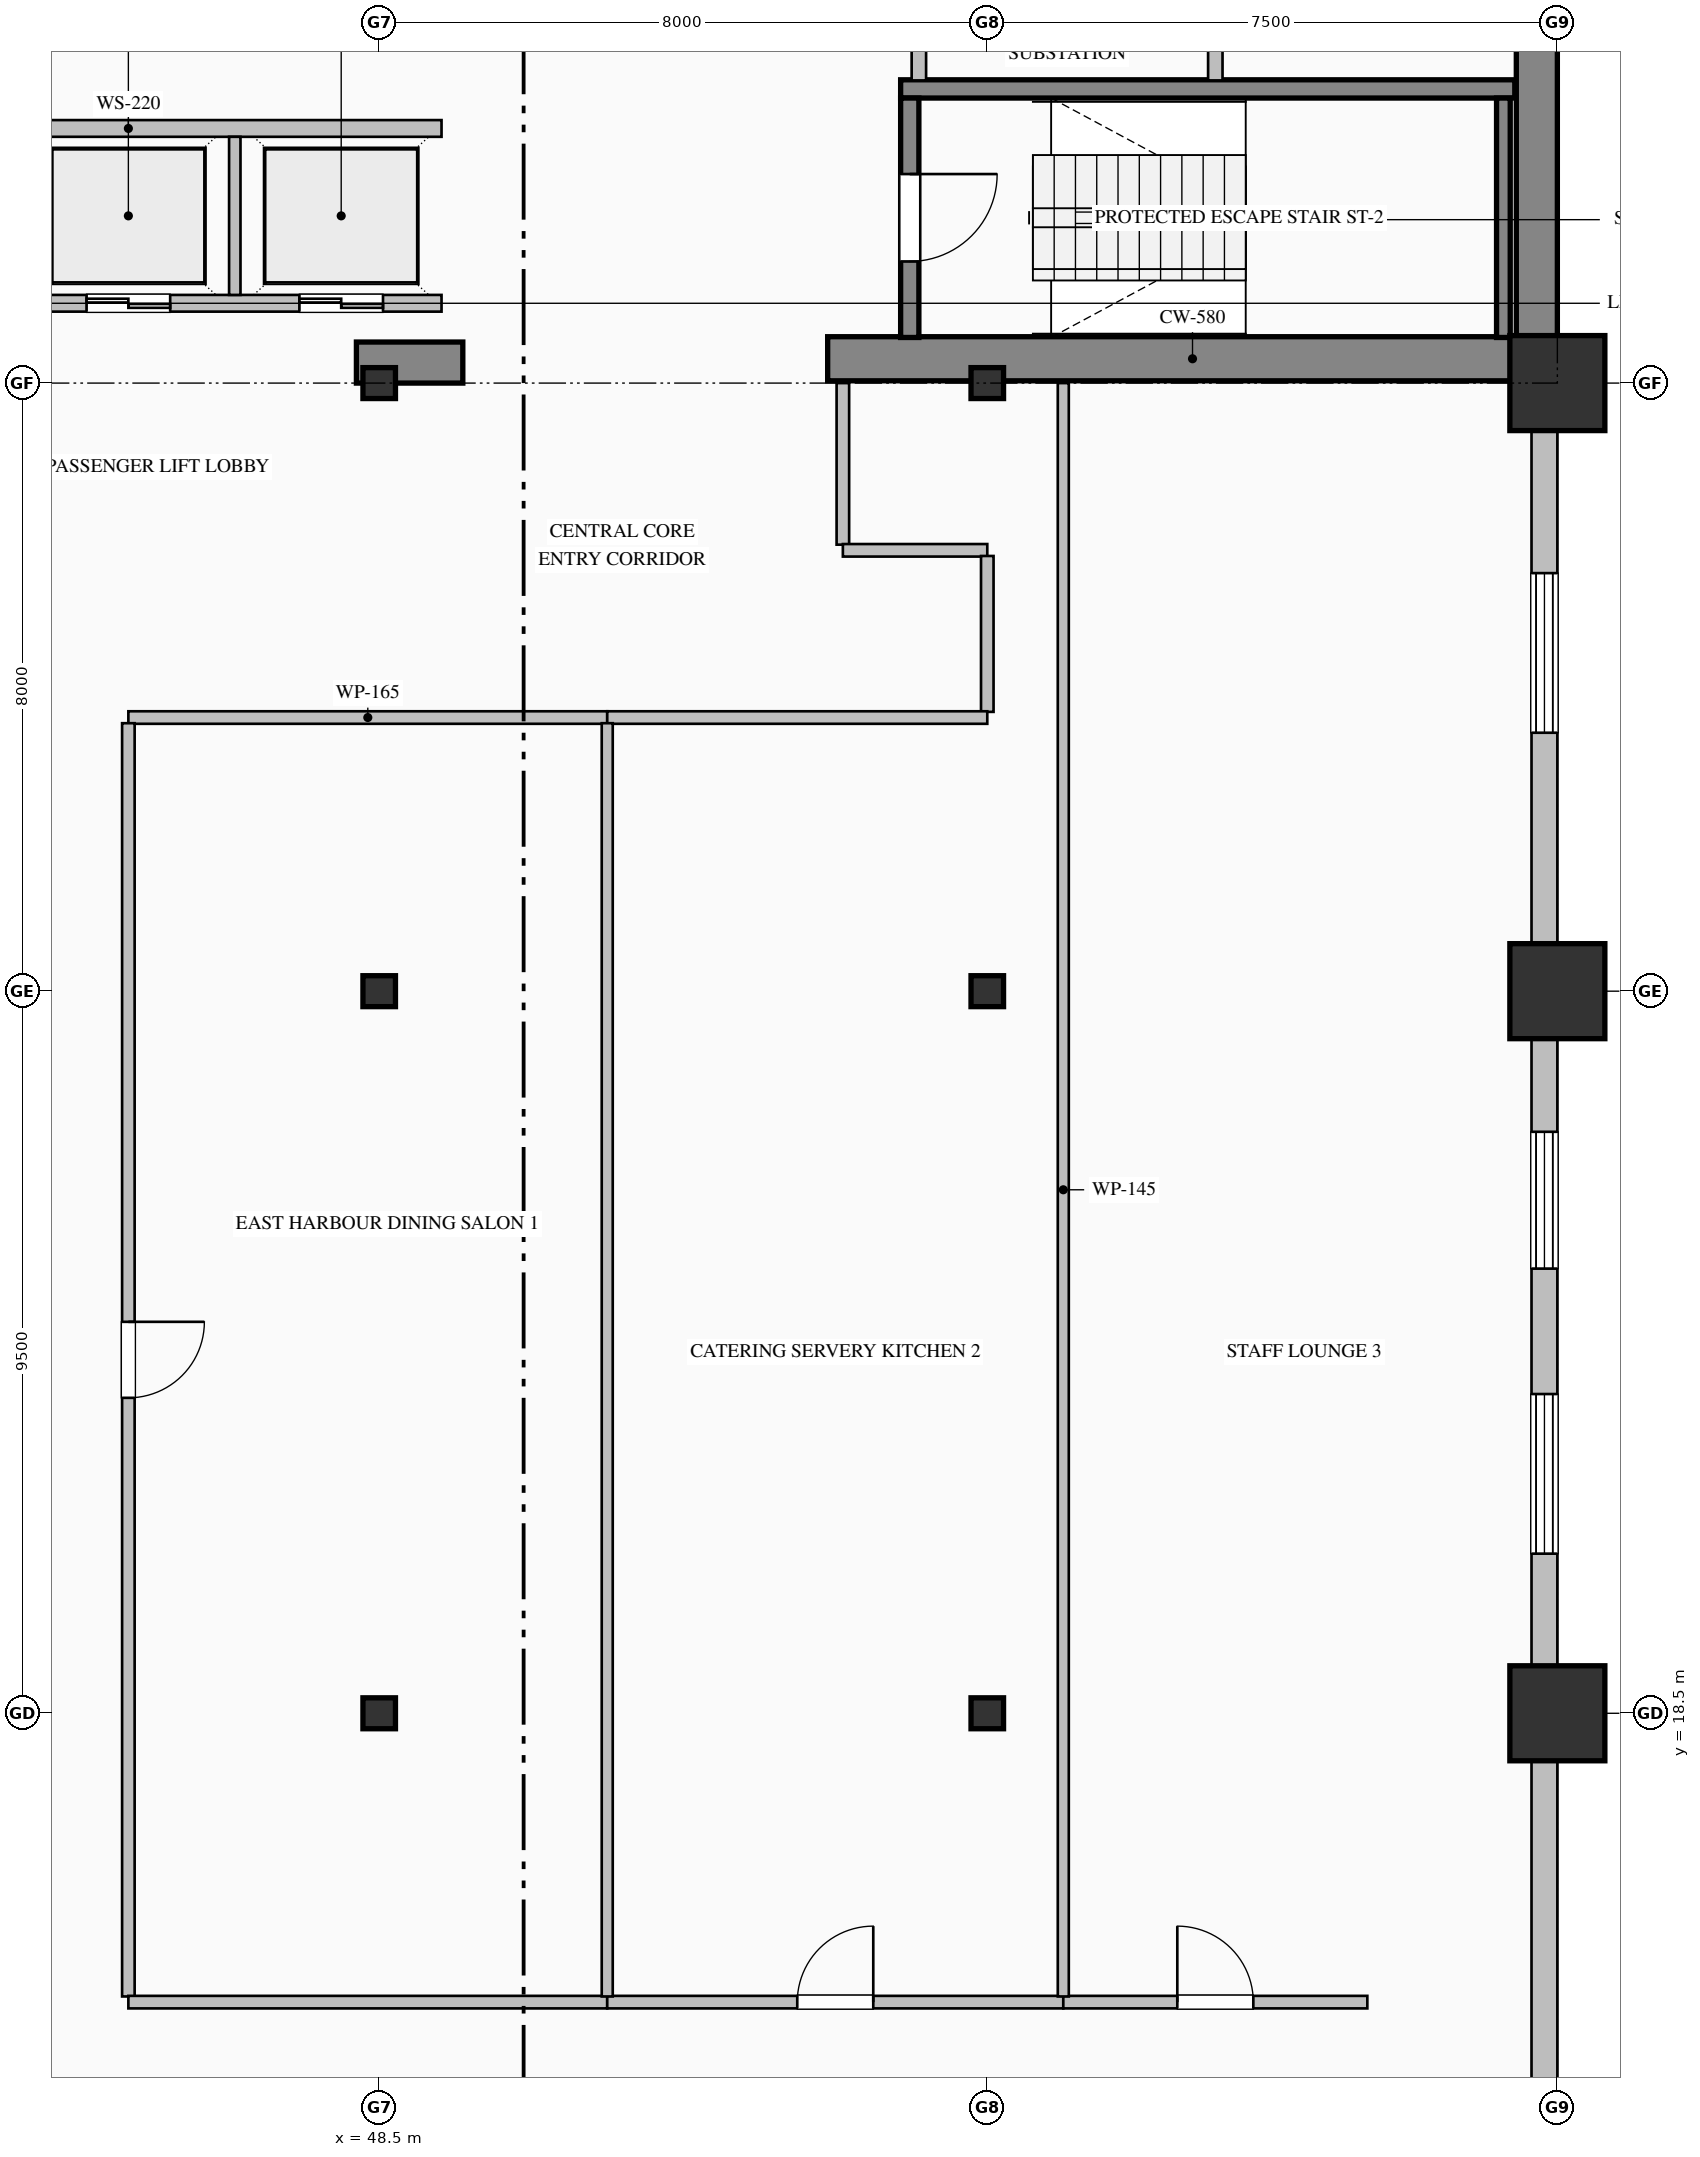
"""IFC4 building model, lengths in metres.
Left out: names, types, materials, properties, quantities, classifications, styles, units other than length and angle.
Written with IfcOpenShell. Run it as: python <this file> out.ifc"""

import sys

from ifc_helpers import new_model, si_unit, direction, frame, frame_2d, origin, origin_2d, place, context, subcontext, project, spatial, rectangle, hollow_rectangle, i_section, extrude, element, fill, save


model = new_model("IFC4")
c1 = context("Model", 3, precision=1e-05, world=origin(), true_north=direction((0.0, 1.0)))
c2 = subcontext(c1, "Body", "Model", "MODEL_VIEW")
j1 = project(units=[si_unit("LENGTHUNIT", "METRE"), si_unit("PLANEANGLEUNIT", "RADIAN")], contexts=[c1])
p1 = place(None, origin())
s1 = spatial("IfcSite", under=j1, at=p1, CompositionType="ELEMENT")
p2 = place(p1, origin())
s2 = spatial("IfcBuilding", under=s1, at=p2, CompositionType="ELEMENT")
p3 = place(p2, frame((0.0, 0.0, 68.2)))
s3 = spatial("IfcBuildingStorey", under=s2, at=p3, CompositionType="ELEMENT", Elevation=68.2)
p4 = place(p3, frame((63.73, 36.32, 0.0), z_axis=(0.0, 0.0, 1.0), x_axis=(0.0, 1.0, 0.0)))
e1 = element("IfcWall", 1, at=p4, inside=s3, PredefinedType="SHEAR", context=c2, shape_type="SweptSolid", body=[
    extrude(rectangle(XDim=15.14, YDim=0.54, at=frame_2d((7.57, 0.0))), origin(), (0.0, 0.0, 1.0), 3.75),
])
p5 = place(p3, frame((48.2, 36.27, 0.0), z_axis=(0.0, 0.0, 1.0), x_axis=(1.0, 0.0, 0.0)))
e2 = element("IfcWall", 2, at=p5, inside=s3, PredefinedType="SHEAR", context=c2, shape_type="SweptSolid", body=[
    extrude(rectangle(XDim=1.4, YDim=0.54, at=frame_2d((0.7, 0.0))), origin(), (0.0, 0.0, 1.0), 3.75),
])
p6 = place(p3, frame((54.4, 36.32, 0.0), z_axis=(0.0, 0.0, 1.0), x_axis=(1.0, 0.0, 0.0)))
e3 = element("IfcWall", 3, at=p6, inside=s3, PredefinedType="SHEAR", context=c2, shape_type="SweptSolid", body=[
    extrude(rectangle(XDim=9.6, YDim=0.58, at=frame_2d((4.8, 0.0))), origin(), (0.0, 0.0, 1.0), 4.0),
])
for number, where, z_axis, x_axis in (
    (4, (48.5, 18.5, 0.0), (0.0, 0.0, 1.0), (1.0, 0.0, 0.0)),
    (5, (48.5, 28.0, 0.0), (0.0, 0.0, 1.0), (1.0, 0.0, 0.0)),
    (6, (48.5, 36.0, 0.0), (0.0, 0.0, 1.0), (1.0, 0.0, 0.0)),
    (7, (56.5, 18.5, 0.0), (0.0, 0.0, 1.0), (1.0, 0.0, 0.0)),
    (8, (56.5, 28.0, 0.0), (0.0, 0.0, 1.0), (1.0, 0.0, 0.0)),
    (9, (56.5, 36.0, 0.0), (0.0, 0.0, 1.0), (1.0, 0.0, 0.0)),
):
    element("IfcColumn", number, at=place(p3, frame(where, z_axis=z_axis, x_axis=x_axis)), inside=s3, PredefinedType="COLUMN", context=c2, shape_type="SweptSolid", body=[
        extrude(i_section(OverallWidth=0.407, OverallDepth=0.428, WebThickness=0.02, FlangeThickness=0.035, FilletRadius=0.022, at=origin_2d()), origin(), (0.0, 0.0, 1.0), 4.0),
    ])
for number, where, z_axis, x_axis in (
    (10, (64.0, 18.5, 0.0), (0.0, 0.0, 1.0), (1.0, 0.0, 0.0)),
    (11, (64.0, 28.0, 0.0), (0.0, 0.0, 1.0), (1.0, 0.0, 0.0)),
    (12, (64.0, 36.0, 0.0), (0.0, 0.0, 1.0), (1.0, 0.0, 0.0)),
):
    element("IfcColumn", number, at=place(p3, frame(where, z_axis=z_axis, x_axis=x_axis)), inside=s3, PredefinedType="COLUMN", context=c2, shape_type="SweptSolid", body=[
        extrude(hollow_rectangle(XDim=1.25, YDim=1.25, WallThickness=0.045, at=origin_2d()), origin(), (0.0, 0.0, 1.0), 4.0),
    ])
p7 = place(p3, frame((63.83, 36.05, 0.0), z_axis=(0.0, 0.0, 1.0), x_axis=(0.0, -1.0, 0.0)))
e13 = element("IfcWall", 13, at=p7, inside=s3, PredefinedType="SOLIDWALL", context=c2, shape_type="SweptSolid", body=[
    extrude(rectangle(XDim=28.05, YDim=0.34, at=frame_2d((14.025, 0.0))), origin(), (0.0, 0.0, 1.0), 3.25),
])
p8 = place(p7, frame((2.55, 0.0, 0.85)))
e14 = element("IfcOpeningElement", 14, at=p8, cuts=e13, PredefinedType="OPENING", context=c2, shape_type="SweptSolid", body=[
    extrude(rectangle(XDim=2.1, YDim=2.05, at=frame_2d((1.05, 1.025))), frame((0.0, 0.18, 0.0), z_axis=(0.0, -1.0, 0.0), x_axis=(1.0, 0.0, 0.0)), (0.0, 0.0, 1.0), 0.36),
])
p9 = place(p7, frame((9.9, 0.0, 0.85)))
e15 = element("IfcOpeningElement", 15, at=p9, cuts=e13, PredefinedType="OPENING", context=c2, shape_type="SweptSolid", body=[
    extrude(rectangle(XDim=1.8, YDim=2.05, at=frame_2d((0.9, 1.025))), frame((0.0, 0.18, 0.0), z_axis=(0.0, -1.0, 0.0), x_axis=(1.0, 0.0, 0.0)), (0.0, 0.0, 1.0), 0.36),
])
p10 = place(p7, frame((13.35, 0.0, 0.85)))
e16 = element("IfcOpeningElement", 16, at=p10, cuts=e13, PredefinedType="OPENING", context=c2, shape_type="SweptSolid", body=[
    extrude(rectangle(XDim=2.1, YDim=2.05, at=frame_2d((1.05, 1.025))), frame((0.0, 0.18, 0.0), z_axis=(0.0, -1.0, 0.0), x_axis=(1.0, 0.0, 0.0)), (0.0, 0.0, 1.0), 0.36),
])
p11 = place(p3, frame((55.36, 39.87, 0.0), z_axis=(0.0, 0.0, 1.0), x_axis=(1.0, 0.0, 0.0)))
e17 = element("IfcWall", 17, at=p11, inside=s3, PredefinedType="SOLIDWALL", context=c2, shape_type="SweptSolid", body=[
    extrude(rectangle(XDim=8.08, YDim=0.24, at=frame_2d((4.04, 0.0))), origin(), (0.0, 0.0, 1.0), 4.0),
])
p12 = place(p3, frame((55.48, 39.75, 0.0), z_axis=(0.0, 0.0, 1.0), x_axis=(0.0, -1.0, 0.0)))
e18 = element("IfcWall", 18, at=p12, inside=s3, PredefinedType="SOLIDWALL", context=c2, shape_type="SweptSolid", body=[
    extrude(rectangle(XDim=3.15, YDim=0.24, at=frame_2d((1.575, 0.0))), origin(), (0.0, 0.0, 1.0), 4.0),
])
p13 = place(p12, frame((1.0, 0.0, 0.0)))
e19 = element("IfcOpeningElement", 19, at=p13, cuts=e18, PredefinedType="OPENING", context=c2, shape_type="SweptSolid", body=[
    extrude(rectangle(XDim=1.15, YDim=2.2, at=frame_2d((0.575, 1.1))), frame((0.0, 0.13, 0.0), z_axis=(0.0, -1.0, 0.0), x_axis=(1.0, 0.0, 0.0)), (0.0, 0.0, 1.0), 0.26),
])
p14 = place(p3, frame((63.29, 36.6, 0.0), z_axis=(0.0, 0.0, 1.0), x_axis=(0.0, 1.0, 0.0)))
e20 = element("IfcWall", 20, at=p14, inside=s3, PredefinedType="SOLIDWALL", context=c2, shape_type="SweptSolid", body=[
    extrude(rectangle(XDim=3.15, YDim=0.18, at=frame_2d((1.575, 0.0))), origin(), (0.0, 0.0, 1.0), 4.0),
])
p15 = place(p3, frame((49.32, 37.05, 0.0), z_axis=(0.0, 0.0, 1.0), x_axis=(-1.0, 0.0, 0.0)))
e21 = element("IfcWall", 21, at=p15, inside=s3, PredefinedType="PARTITIONING", context=c2, shape_type="SweptSolid", body=[
    extrude(rectangle(XDim=8.24, YDim=0.22, at=frame_2d((4.12, 0.0))), origin(), (0.0, 0.0, 1.0), 3.75),
])
p16 = place(p15, frame((6.37, 0.0, 0.0)))
e22 = element("IfcOpeningElement", 22, at=p16, cuts=e21, PredefinedType="OPENING", context=c2, shape_type="SweptSolid", body=[
    extrude(rectangle(XDim=1.1, YDim=2.2, at=frame_2d((0.55, 1.1))), frame((0.0, 0.12, 0.0), z_axis=(0.0, -1.0, 0.0), x_axis=(1.0, 0.0, 0.0)), (0.0, 0.0, 1.0), 0.24),
])
p17 = place(p15, frame((3.57, 0.0, 0.0)))
e23 = element("IfcOpeningElement", 23, at=p17, cuts=e21, PredefinedType="OPENING", context=c2, shape_type="SweptSolid", body=[
    extrude(rectangle(XDim=1.1, YDim=2.2, at=frame_2d((0.55, 1.1))), frame((0.0, 0.12, 0.0), z_axis=(0.0, -1.0, 0.0), x_axis=(1.0, 0.0, 0.0)), (0.0, 0.0, 1.0), 0.24),
])
p18 = place(p15, frame((0.77, 0.0, 0.0)))
e24 = element("IfcOpeningElement", 24, at=p18, cuts=e21, PredefinedType="OPENING", context=c2, shape_type="SweptSolid", body=[
    extrude(rectangle(XDim=1.1, YDim=2.2, at=frame_2d((0.55, 1.1))), frame((0.0, 0.12, 0.0), z_axis=(0.0, -1.0, 0.0), x_axis=(1.0, 0.0, 0.0)), (0.0, 0.0, 1.0), 0.24),
])
p19 = place(p3, frame((41.08, 39.35, 0.0), z_axis=(0.0, 0.0, 1.0), x_axis=(1.0, 0.0, 0.0)))
e25 = element("IfcWall", 25, at=p19, inside=s3, PredefinedType="PARTITIONING", context=c2, shape_type="SweptSolid", body=[
    extrude(rectangle(XDim=8.24, YDim=0.22, at=frame_2d((4.12, 0.0))), origin(), (0.0, 0.0, 1.0), 3.75),
])
p20 = place(p3, frame((46.6, 37.16, 0.0), z_axis=(0.0, 0.0, 1.0), x_axis=(0.0, 1.0, 0.0)))
e26 = element("IfcWall", 26, at=p20, inside=s3, PredefinedType="PARTITIONING", context=c2, shape_type="SweptSolid", body=[
    extrude(rectangle(XDim=2.08, YDim=0.15, at=frame_2d((1.04, 0.0))), origin(), (0.0, 0.0, 1.0), 3.75),
])
for number, where, z_axis, x_axis in (
    (27, (55.6, 42.713, 0.0), (0.0, 0.0, 1.0), (0.0, -1.0, 0.0)),
    (28, (59.5, 42.713, 0.0), (0.0, 0.0, 1.0), (0.0, -1.0, 0.0)),
):
    element("IfcWall", number, at=place(p3, frame(where, z_axis=z_axis, x_axis=x_axis)), inside=s3, PredefinedType="PARTITIONING", context=c2, shape_type="SweptSolid", body=[
        extrude(rectangle(XDim=2.731, YDim=0.19, at=frame_2d((1.365, 0.0))), origin(), (0.0, 0.0, 1.0), 3.75),
    ])
p21 = place(p3, frame((51.5, 31.6, 0.0), z_axis=(0.0, 0.0, 1.0), x_axis=(-1.0, 0.0, 0.0)))
e29 = element("IfcWall", 29, at=p21, inside=s3, PredefinedType="PARTITIONING", context=c2, shape_type="SweptSolid", body=[
    extrude(rectangle(XDim=6.3, YDim=0.165, at=frame_2d((3.15, 0.0))), origin(), (0.0, 0.0, 1.0), 3.75),
])
p22 = place(p3, frame((54.6, 36.0, 0.0), z_axis=(0.0, 0.0, 1.0), x_axis=(0.0, -1.0, 0.0)))
e30 = element("IfcWall", 30, at=p22, inside=s3, PredefinedType="PARTITIONING", context=c2, shape_type="SweptSolid", body=[
    extrude(rectangle(XDim=2.125, YDim=0.165, at=frame_2d((1.063, 0.0))), origin(), (0.0, 0.0, 1.0), 3.75),
])
p23 = place(p3, frame((54.6, 33.8, 0.0), z_axis=(0.0, 0.0, 1.0), x_axis=(1.0, 0.0, 0.0)))
e31 = element("IfcWall", 31, at=p23, inside=s3, PredefinedType="PARTITIONING", context=c2, shape_type="SweptSolid", body=[
    extrude(rectangle(XDim=1.9, YDim=0.165, at=frame_2d((0.95, 0.0))), origin(), (0.0, 0.0, 1.0), 3.75),
])
p24 = place(p3, frame((56.5, 33.726, 0.0), z_axis=(0.0, 0.0, 1.0), x_axis=(0.0, -1.0, 0.0)))
e32 = element("IfcWall", 32, at=p24, inside=s3, PredefinedType="PARTITIONING", context=c2, shape_type="SweptSolid", body=[
    extrude(rectangle(XDim=2.051, YDim=0.165, at=frame_2d((1.025, 0.0))), origin(), (0.0, 0.0, 1.0), 3.042),
])
p25 = place(p3, frame((56.5, 31.6, 0.0), z_axis=(0.0, 0.0, 1.0), x_axis=(-1.0, 0.0, 0.0)))
e33 = element("IfcWall", 33, at=p25, inside=s3, PredefinedType="PARTITIONING", context=c2, shape_type="SweptSolid", body=[
    extrude(rectangle(XDim=5.0, YDim=0.165, at=frame_2d((2.5, 0.0))), origin(), (0.0, 0.0, 1.0), 3.75),
])
p26 = place(p3, frame((45.2, 31.525, 0.0), z_axis=(0.0, 0.0, 1.0), x_axis=(0.0, -1.0, 0.0)))
e34 = element("IfcWall", 34, at=p26, inside=s3, PredefinedType="PARTITIONING", context=c2, shape_type="SweptSolid", body=[
    extrude(rectangle(XDim=16.751, YDim=0.165, at=frame_2d((8.375, 0.0))), origin(), (0.0, 0.0, 1.0), 3.75),
])
p27 = place(p26, frame((7.875, 0.0, 0.0)))
e35 = element("IfcOpeningElement", 35, at=p27, cuts=e34, PredefinedType="OPENING", context=c2, shape_type="SweptSolid", body=[
    extrude(rectangle(XDim=1.0, YDim=2.15, at=frame_2d((0.5, 1.075))), frame((0.0, 0.093, 0.0), z_axis=(0.0, -1.0, 0.0), x_axis=(1.0, 0.0, 0.0)), (0.0, 0.0, 1.0), 0.185),
])
p28 = place(p3, frame((45.2, 14.7, 0.0), z_axis=(0.0, 0.0, 1.0), x_axis=(1.0, 0.0, 0.0)))
e36 = element("IfcWall", 36, at=p28, inside=s3, PredefinedType="PARTITIONING", context=c2, shape_type="SweptSolid", body=[
    extrude(rectangle(XDim=6.3, YDim=0.165, at=frame_2d((3.15, 0.0))), origin(), (0.0, 0.0, 1.0), 3.75),
])
p29 = place(p3, frame((51.5, 14.7, 0.0), z_axis=(0.0, 0.0, 1.0), x_axis=(1.0, 0.0, 0.0)))
e37 = element("IfcWall", 37, at=p29, inside=s3, PredefinedType="PARTITIONING", context=c2, shape_type="SweptSolid", body=[
    extrude(rectangle(XDim=6.0, YDim=0.165, at=frame_2d((3.0, 0.0))), origin(), (0.0, 0.0, 1.0), 3.75),
])
p30 = place(p29, frame((2.5, 0.0, 0.0)))
e38 = element("IfcOpeningElement", 38, at=p30, cuts=e37, PredefinedType="OPENING", context=c2, shape_type="SweptSolid", body=[
    extrude(rectangle(XDim=1.0, YDim=2.15, at=frame_2d((0.5, 1.075))), frame((0.0, 0.093, 0.0), z_axis=(0.0, -1.0, 0.0), x_axis=(1.0, 0.0, 0.0)), (0.0, 0.0, 1.0), 0.185),
])
p31 = place(p3, frame((57.5, 14.7, 0.0), z_axis=(0.0, 0.0, 1.0), x_axis=(1.0, 0.0, 0.0)))
e39 = element("IfcWall", 39, at=p31, inside=s3, PredefinedType="PARTITIONING", context=c2, shape_type="SweptSolid", body=[
    extrude(rectangle(XDim=4.0, YDim=0.165, at=frame_2d((2.0, 0.0))), origin(), (0.0, 0.0, 1.0), 3.75),
])
p32 = place(p31, frame((1.5, 0.0, 0.0)))
e40 = element("IfcOpeningElement", 40, at=p32, cuts=e39, PredefinedType="OPENING", context=c2, shape_type="SweptSolid", body=[
    extrude(rectangle(XDim=1.0, YDim=2.15, at=frame_2d((0.5, 1.075))), frame((0.0, 0.093, 0.0), z_axis=(0.0, -1.0, 0.0), x_axis=(1.0, 0.0, 0.0)), (0.0, 0.0, 1.0), 0.185),
])
p33 = place(p3, frame((51.5, 31.525, 0.0), z_axis=(0.0, 0.0, 1.0), x_axis=(0.0, -1.0, 0.0)))
e41 = element("IfcWall", 41, at=p33, inside=s3, PredefinedType="PARTITIONING", context=c2, shape_type="SweptSolid", body=[
    extrude(rectangle(XDim=16.751, YDim=0.145, at=frame_2d((8.375, 0.0))), origin(), (0.0, 0.0, 1.0), 3.75),
])
p34 = place(p3, frame((57.5, 36.0, 0.0), z_axis=(0.0, 0.0, 1.0), x_axis=(0.0, -1.0, 0.0)))
e42 = element("IfcWall", 42, at=p34, inside=s3, PredefinedType="PARTITIONING", context=c2, shape_type="SweptSolid", body=[
    extrude(rectangle(XDim=21.226, YDim=0.145, at=frame_2d((10.613, 0.0))), origin(), (0.0, 0.0, 1.0), 3.75),
])
p35 = place(p8, origin())
e43 = element("IfcWindow", 43, at=p35, inside=s3, PartitioningType="TRIPLE_PANEL_VERTICAL", PredefinedType="WINDOW", context=c2, shape_type="SweptSolid", body=[
    extrude(rectangle(XDim=2.1, YDim=2.05, at=frame_2d((1.05, 1.025))), frame((0.0, 0.15, 0.0), z_axis=(0.0, -1.0, 0.0), x_axis=(1.0, 0.0, 0.0)), (0.0, 0.0, 1.0), 0.06),
])
fill(e14, e43)
p36 = place(p9, origin())
e44 = element("IfcWindow", 44, at=p36, inside=s3, PartitioningType="TRIPLE_PANEL_VERTICAL", PredefinedType="WINDOW", context=c2, shape_type="SweptSolid", body=[
    extrude(rectangle(XDim=1.8, YDim=2.05, at=frame_2d((0.9, 1.025))), frame((0.0, 0.15, 0.0), z_axis=(0.0, -1.0, 0.0), x_axis=(1.0, 0.0, 0.0)), (0.0, 0.0, 1.0), 0.06),
])
fill(e15, e44)
p37 = place(p10, origin())
e45 = element("IfcWindow", 45, at=p37, inside=s3, PartitioningType="TRIPLE_PANEL_VERTICAL", PredefinedType="WINDOW", context=c2, shape_type="SweptSolid", body=[
    extrude(rectangle(XDim=2.1, YDim=2.05, at=frame_2d((1.05, 1.025))), frame((0.0, 0.15, 0.0), z_axis=(0.0, -1.0, 0.0), x_axis=(1.0, 0.0, 0.0)), (0.0, 0.0, 1.0), 0.06),
])
fill(e16, e45)
p38 = place(p13, origin())
e46 = element("IfcDoor", 46, at=p38, inside=s3, OperationType="SINGLE_SWING_LEFT", PredefinedType="DOOR", context=c2, shape_type="SweptSolid", body=[
    extrude(rectangle(XDim=1.15, YDim=2.2, at=frame_2d((0.575, 1.1))), frame((0.0, 0.025, 0.0), z_axis=(0.0, -1.0, 0.0), x_axis=(1.0, 0.0, 0.0)), (0.0, 0.0, 1.0), 0.05),
])
fill(e19, e46)
p39 = place(p17, origin())
e47 = element("IfcDoor", 47, at=p39, inside=s3, OperationType="DOUBLE_DOOR_SLIDING", PredefinedType="DOOR", context=c2, shape_type="SweptSolid", body=[
    extrude(rectangle(XDim=1.1, YDim=2.2, at=frame_2d((0.55, 1.1))), frame((0.0, 0.025, 0.0), z_axis=(0.0, -1.0, 0.0), x_axis=(1.0, 0.0, 0.0)), (0.0, 0.0, 1.0), 0.05),
])
fill(e23, e47)
p40 = place(p18, origin())
e48 = element("IfcDoor", 48, at=p40, inside=s3, OperationType="DOUBLE_DOOR_SLIDING", PredefinedType="DOOR", context=c2, shape_type="SweptSolid", body=[
    extrude(rectangle(XDim=1.1, YDim=2.2, at=frame_2d((0.55, 1.1))), frame((0.0, 0.025, 0.0), z_axis=(0.0, -1.0, 0.0), x_axis=(1.0, 0.0, 0.0)), (0.0, 0.0, 1.0), 0.05),
])
fill(e24, e48)
p41 = place(p27, origin())
e49 = element("IfcDoor", 49, at=p41, inside=s3, OperationType="SINGLE_SWING_LEFT", PredefinedType="DOOR", context=c2, shape_type="SweptSolid", body=[
    extrude(rectangle(XDim=1.0, YDim=2.15, at=frame_2d((0.5, 1.075))), frame((0.0, 0.025, 0.0), z_axis=(0.0, -1.0, 0.0), x_axis=(1.0, 0.0, 0.0)), (0.0, 0.0, 1.0), 0.05),
])
fill(e35, e49)
p42 = place(p30, origin())
e50 = element("IfcDoor", 50, at=p42, inside=s3, OperationType="SINGLE_SWING_RIGHT", PredefinedType="DOOR", context=c2, shape_type="SweptSolid", body=[
    extrude(rectangle(XDim=1.0, YDim=2.15, at=frame_2d((0.5, 1.075))), frame((0.0, 0.025, 0.0), z_axis=(0.0, -1.0, 0.0), x_axis=(1.0, 0.0, 0.0)), (0.0, 0.0, 1.0), 0.05),
])
fill(e38, e50)
p43 = place(p32, origin())
e51 = element("IfcDoor", 51, at=p43, inside=s3, OperationType="SINGLE_SWING_LEFT", PredefinedType="DOOR", context=c2, shape_type="SweptSolid", body=[
    extrude(rectangle(XDim=1.0, YDim=2.15, at=frame_2d((0.5, 1.075))), frame((0.0, 0.025, 0.0), z_axis=(0.0, -1.0, 0.0), x_axis=(1.0, 0.0, 0.0)), (0.0, 0.0, 1.0), 0.05),
])
fill(e40, e51)
save(model, sys.argv[1])
